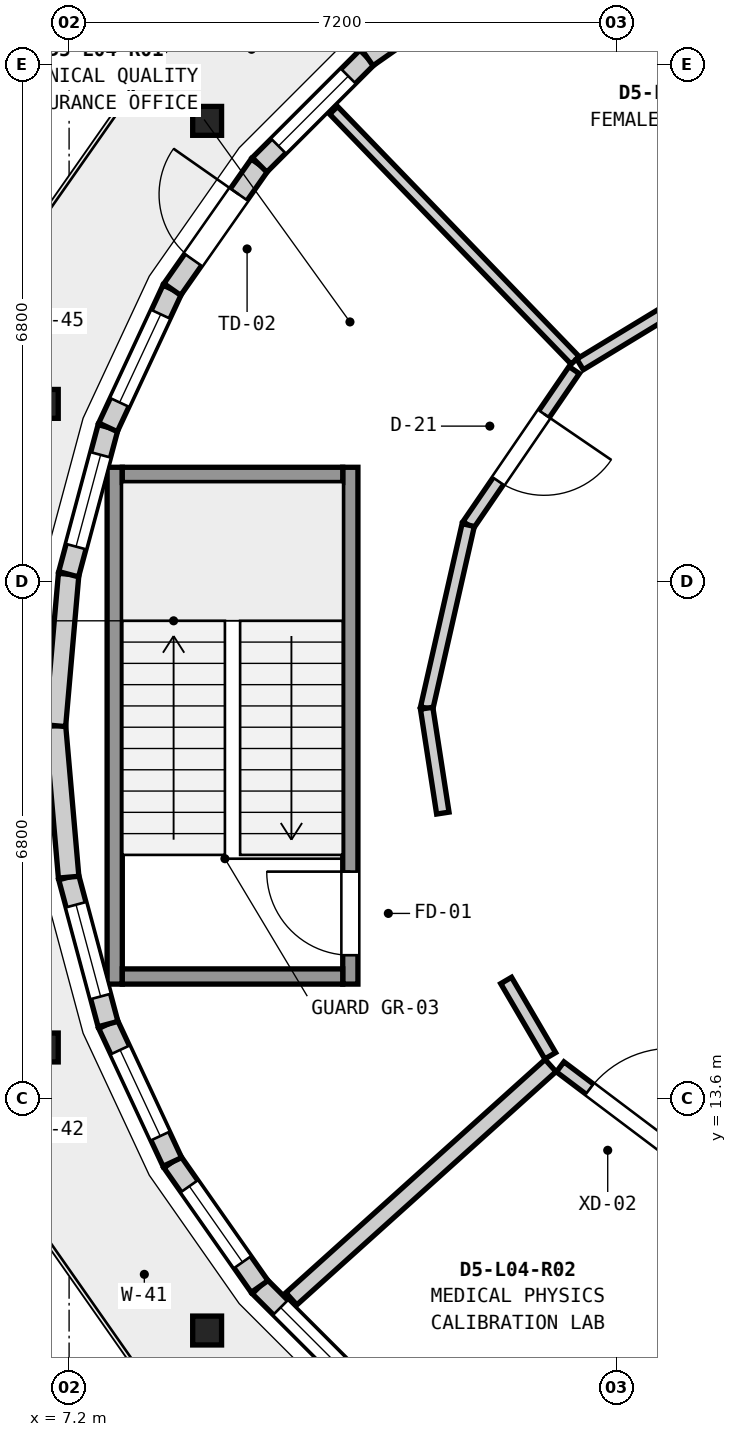
"""IFC4 building model, lengths in metres.
Left out: names, types, materials, properties, quantities, classifications, styles, units other than length and angle.
Written with IfcOpenShell. Run it as: python <this file> out.ifc"""

import sys

from ifc_helpers import new_model, si_unit, direction, frame, frame_2d, origin, origin_2d, place, context, subcontext, project, spatial, rectangle, circle, extrude, element, fill, save


model = new_model("IFC4")
c1 = context("Model", 3, precision=1e-05, world=origin(), true_north=direction((0.0, 1.0)))
c2 = subcontext(c1, "Body", "Model", "MODEL_VIEW")
j1 = project(units=[si_unit("LENGTHUNIT", "METRE"), si_unit("PLANEANGLEUNIT", "RADIAN")], contexts=[c1])
p1 = place(None, origin())
s1 = spatial("IfcSite", under=j1, at=p1, CompositionType="ELEMENT")
p2 = place(p1, origin())
s2 = spatial("IfcBuilding", under=s1, at=p2, CompositionType="ELEMENT")
p3 = place(p2, frame((0.0, 0.0, 17.15)))
s3 = spatial("IfcBuildingStorey", under=s2, at=p3, CompositionType="ELEMENT", Elevation=17.15)
for number, where, z_axis, x_axis in (
    (1, (9.016, 26.458, 0.0), (0.0, 0.0, 1.0), (1.0, 0.0, 0.0)),
    (2, (6.867, 22.734, 0.0), (0.0, 0.0, 1.0), (1.0, 0.0, 0.0)),
    (3, (6.867, 14.266, 0.0), (0.0, 0.0, 1.0), (1.0, 0.0, 0.0)),
    (4, (9.016, 10.542, 0.0), (0.0, 0.0, 1.0), (1.0, 0.0, 0.0)),
):
    element("IfcColumn", number, at=place(p3, frame(where, z_axis=z_axis, x_axis=x_axis)), inside=s3, PredefinedType="PILASTER", context=c2, shape_type="SweptSolid", body=[
        extrude(circle(Radius=0.19, at=origin_2d()), origin(), (0.0, 0.0, 1.0), 4.2),
    ])
p4 = place(p3, frame((11.121, 9.706, 0.0), z_axis=(0.0, 0.0, 1.0), x_axis=(-0.707106781187, 0.707106781187, 0.0)))
e5 = element("IfcWall", 5, at=p4, inside=s3, PredefinedType="ELEMENTEDWALL", context=c2, shape_type="SweptSolid", body=[
    extrude(rectangle(XDim=2.001, YDim=0.27, at=frame_2d((1.0, 0.0))), origin(), (0.0, 0.0, 1.0), 3.314),
])
p5 = place(p4, frame((0.391, 0.0, 0.85)))
e6 = element("IfcOpeningElement", 6, at=p5, cuts=e5, PredefinedType="OPENING", context=c2, shape_type="SweptSolid", body=[
    extrude(rectangle(XDim=1.22, YDim=1.5, at=frame_2d((0.61, 0.75))), frame((0.0, 0.145, 0.0), z_axis=(0.0, -1.0, 0.0), x_axis=(1.0, 0.0, 0.0)), (0.0, 0.0, 1.0), 0.29),
])
p6 = place(p3, frame((9.706, 11.121, 0.0), z_axis=(0.0, 0.0, 1.0), x_axis=(-0.573699793029, 0.819065655169, 0.0)))
e7 = element("IfcWall", 7, at=p6, inside=s3, PredefinedType="ELEMENTEDWALL", context=c2, shape_type="SweptSolid", body=[
    extrude(rectangle(XDim=2.001, YDim=0.27, at=frame_2d((1.0, 0.0))), origin(), (0.0, 0.0, 1.0), 3.314),
])
p7 = place(p6, frame((0.391, 0.0, 0.85)))
e8 = element("IfcOpeningElement", 8, at=p7, cuts=e7, PredefinedType="OPENING", context=c2, shape_type="SweptSolid", body=[
    extrude(rectangle(XDim=1.22, YDim=1.8, at=frame_2d((0.61, 0.9))), frame((0.0, 0.145, 0.0), z_axis=(0.0, -1.0, 0.0), x_axis=(1.0, 0.0, 0.0)), (0.0, 0.0, 1.0), 0.29),
])
p8 = place(p3, frame((8.558, 12.76, 0.0), z_axis=(0.0, 0.0, 1.0), x_axis=(-0.422751915713, 0.906245451167, 0.0)))
e9 = element("IfcWall", 9, at=p8, inside=s3, PredefinedType="ELEMENTEDWALL", context=c2, shape_type="SweptSolid", body=[
    extrude(rectangle(XDim=2.002, YDim=0.27, at=frame_2d((1.001, 0.0))), origin(), (0.0, 0.0, 1.0), 3.314),
])
p9 = place(p8, frame((0.376, 0.0, 0.85)))
e10 = element("IfcOpeningElement", 10, at=p9, cuts=e9, PredefinedType="OPENING", context=c2, shape_type="SweptSolid", body=[
    extrude(rectangle(XDim=1.25, YDim=1.5, at=frame_2d((0.625, 0.75))), frame((0.0, 0.145, 0.0), z_axis=(0.0, -1.0, 0.0), x_axis=(1.0, 0.0, 0.0)), (0.0, 0.0, 1.0), 0.29),
])
p10 = place(p3, frame((7.712, 14.574, 0.0), z_axis=(0.0, 0.0, 1.0), x_axis=(-0.258748280927, 0.965944784715, 0.0)))
e11 = element("IfcWall", 11, at=p10, inside=s3, PredefinedType="ELEMENTEDWALL", context=c2, shape_type="SweptSolid", body=[
    extrude(rectangle(XDim=2.001, YDim=0.27, at=frame_2d((1.0, 0.0))), origin(), (0.0, 0.0, 1.0), 3.314),
])
p11 = place(p10, frame((0.376, 0.0, 0.85)))
e12 = element("IfcOpeningElement", 12, at=p11, cuts=e11, PredefinedType="OPENING", context=c2, shape_type="SweptSolid", body=[
    extrude(rectangle(XDim=1.25, YDim=1.8, at=frame_2d((0.625, 0.9))), frame((0.0, 0.145, 0.0), z_axis=(0.0, -1.0, 0.0), x_axis=(1.0, 0.0, 0.0)), (0.0, 0.0, 1.0), 0.29),
])
for number, where, z_axis, x_axis in (
    (13, (7.194, 16.507, 0.0), (0.0, 0.0, 1.0), (-0.087, 0.996, 0.0)),
    (14, (7.02, 18.5, 0.0), (0.0, 0.0, 1.0), (0.087, 0.996, 0.0)),
):
    element("IfcWall", number, at=place(p3, frame(where, z_axis=z_axis, x_axis=x_axis)), inside=s3, PredefinedType="ELEMENTEDWALL", context=c2, shape_type="SweptSolid", body=[
        extrude(rectangle(XDim=2.0, YDim=0.27, at=frame_2d((1.0, 0.0))), origin(), (0.0, 0.0, 1.0), 3.314),
    ])
p12 = place(p3, frame((7.194, 20.493, 0.0), z_axis=(0.0, 0.0, 1.0), x_axis=(0.258748280927, 0.965944784715, 0.0)))
e15 = element("IfcWall", 15, at=p12, inside=s3, PredefinedType="ELEMENTEDWALL", context=c2, shape_type="SweptSolid", body=[
    extrude(rectangle(XDim=2.001, YDim=0.27, at=frame_2d((1.0, 0.0))), origin(), (0.0, 0.0, 1.0), 3.314),
])
p13 = place(p12, frame((0.376, 0.0, 0.85)))
e16 = element("IfcOpeningElement", 16, at=p13, cuts=e15, PredefinedType="OPENING", context=c2, shape_type="SweptSolid", body=[
    extrude(rectangle(XDim=1.25, YDim=2.1, at=frame_2d((0.625, 1.05))), frame((0.0, 0.145, 0.0), z_axis=(0.0, -1.0, 0.0), x_axis=(1.0, 0.0, 0.0)), (0.0, 0.0, 1.0), 0.29),
])
p14 = place(p3, frame((7.712, 22.426, 0.0), z_axis=(0.0, 0.0, 1.0), x_axis=(0.422751915713, 0.906245451167, 0.0)))
e17 = element("IfcWall", 17, at=p14, inside=s3, PredefinedType="ELEMENTEDWALL", context=c2, shape_type="SweptSolid", body=[
    extrude(rectangle(XDim=2.002, YDim=0.27, at=frame_2d((1.001, 0.0))), origin(), (0.0, 0.0, 1.0), 3.314),
])
p15 = place(p14, frame((0.361, 0.0, 0.85)))
e18 = element("IfcOpeningElement", 18, at=p15, cuts=e17, PredefinedType="OPENING", context=c2, shape_type="SweptSolid", body=[
    extrude(rectangle(XDim=1.28, YDim=1.65, at=frame_2d((0.64, 0.825))), frame((0.0, 0.145, 0.0), z_axis=(0.0, -1.0, 0.0), x_axis=(1.0, 0.0, 0.0)), (0.0, 0.0, 1.0), 0.29),
])
p16 = place(p3, frame((8.558, 24.24, 0.0), z_axis=(0.0, 0.0, 1.0), x_axis=(0.573699793029, 0.819065655169, 0.0)))
e19 = element("IfcWall", 19, at=p16, inside=s3, PredefinedType="ELEMENTEDWALL", context=c2, shape_type="SweptSolid", body=[
    extrude(rectangle(XDim=2.001, YDim=0.27, at=frame_2d((1.0, 0.0))), origin(), (0.0, 0.0, 1.0), 3.314),
])
p17 = place(p16, frame((0.476, 0.0, 0.0)))
e20 = element("IfcOpeningElement", 20, at=p17, cuts=e19, PredefinedType="OPENING", context=c2, shape_type="SweptSolid", body=[
    extrude(rectangle(XDim=1.05, YDim=2.15, at=frame_2d((0.525, 1.075))), frame((0.0, 0.145, 0.0), z_axis=(0.0, -1.0, 0.0), x_axis=(1.0, 0.0, 0.0)), (0.0, 0.0, 1.0), 0.29),
])
p18 = place(p3, frame((9.706, 25.879, 0.0), z_axis=(0.0, 0.0, 1.0), x_axis=(0.707106781187, 0.707106781187, 0.0)))
e21 = element("IfcWall", 21, at=p18, inside=s3, PredefinedType="ELEMENTEDWALL", context=c2, shape_type="SweptSolid", body=[
    extrude(rectangle(XDim=2.001, YDim=0.27, at=frame_2d((1.0, 0.0))), origin(), (0.0, 0.0, 1.0), 3.314),
])
p19 = place(p18, frame((0.351, 0.0, 0.85)))
e22 = element("IfcOpeningElement", 22, at=p19, cuts=e21, PredefinedType="OPENING", context=c2, shape_type="SweptSolid", body=[
    extrude(rectangle(XDim=1.3, YDim=1.4, at=frame_2d((0.65, 0.7))), frame((0.0, 0.145, 0.0), z_axis=(0.0, -1.0, 0.0), x_axis=(1.0, 0.0, 0.0)), (0.0, 0.0, 1.0), 0.29),
])
p20 = place(p3, frame((11.121, 27.294, 0.0), z_axis=(0.0, 0.0, 1.0), x_axis=(0.819065655169, 0.573699793029, 0.0)))
e23 = element("IfcWall", 23, at=p20, inside=s3, PredefinedType="ELEMENTEDWALL", context=c2, shape_type="SweptSolid", body=[
    extrude(rectangle(XDim=2.001, YDim=0.27, at=frame_2d((1.0, 0.0))), origin(), (0.0, 0.0, 1.0), 3.314),
])
p21 = place(p20, frame((0.351, 0.0, 0.85)))
e24 = element("IfcOpeningElement", 24, at=p21, cuts=e23, PredefinedType="OPENING", context=c2, shape_type="SweptSolid", body=[
    extrude(rectangle(XDim=1.3, YDim=1.7, at=frame_2d((0.65, 0.85))), frame((0.0, 0.145, 0.0), z_axis=(0.0, -1.0, 0.0), x_axis=(1.0, 0.0, 0.0)), (0.0, 0.0, 1.0), 0.29),
])
p22 = place(p3, frame((10.9, 15.1, 0.0), z_axis=(0.0, 0.0, 1.0), x_axis=(0.0, 1.0, 0.0)))
e25 = element("IfcWall", 25, at=p22, inside=s3, PredefinedType="SHEAR", context=c2, shape_type="SweptSolid", body=[
    extrude(rectangle(XDim=6.8, YDim=0.2, at=frame_2d((3.4, 0.0))), origin(), (0.0, 0.0, 1.0), 3.96),
])
p23 = place(p22, frame((0.38, 0.0, 0.0)))
e26 = element("IfcOpeningElement", 26, at=p23, cuts=e25, PredefinedType="OPENING", context=c2, shape_type="SweptSolid", body=[
    extrude(rectangle(XDim=1.1, YDim=2.15, at=frame_2d((0.55, 1.075))), frame((0.0, 0.11, 0.0), z_axis=(0.0, -1.0, 0.0), x_axis=(1.0, 0.0, 0.0)), (0.0, 0.0, 1.0), 0.22),
])
p24 = place(p3, frame((7.8, 15.1, 0.0), z_axis=(0.0, 0.0, 1.0), x_axis=(0.0, 1.0, 0.0)))
e27 = element("IfcWall", 27, at=p24, inside=s3, PredefinedType="SHEAR", context=c2, shape_type="SweptSolid", body=[
    extrude(rectangle(XDim=6.8, YDim=0.2, at=frame_2d((3.4, 0.0))), origin(), (0.0, 0.0, 1.0), 3.96),
])
for number, where, z_axis, x_axis in (
    (28, (10.8, 15.2, 0.0), (0.0, 0.0, 1.0), (-1.0, 0.0, 0.0)),
    (29, (10.8, 21.8, 0.0), (0.0, 0.0, 1.0), (-1.0, 0.0, 0.0)),
):
    element("IfcWall", number, at=place(p3, frame(where, z_axis=z_axis, x_axis=x_axis)), inside=s3, PredefinedType="SHEAR", context=c2, shape_type="SweptSolid", body=[
        extrude(rectangle(XDim=2.9, YDim=0.2, at=frame_2d((1.45, 0.0))), origin(), (0.0, 0.0, 1.0), 3.96),
    ])
p25 = place(p3, frame((13.858, 23.307, 0.0), z_axis=(0.0, 0.0, 1.0), x_axis=(-0.694751659022, 0.719249700928, 0.0)))
e30 = element("IfcWall", 30, at=p25, inside=s3, PredefinedType="PARTITIONING", context=c2, shape_type="SweptSolid", body=[
    extrude(rectangle(XDim=4.574, YDim=0.145, at=frame_2d((2.287, 0.0))), origin(), (0.0, 0.0, 1.0), 3.279),
])
p26 = place(p3, frame((13.534, 14.028, 0.0), z_axis=(0.0, 0.0, 1.0), x_axis=(-0.743275623073, -0.668985312354, 0.0)))
e31 = element("IfcWall", 31, at=p26, inside=s3, PredefinedType="SOLIDWALL", context=c2, shape_type="SweptSolid", body=[
    extrude(rectangle(XDim=4.588, YDim=0.215, at=frame_2d((2.294, 0.0))), origin(), (0.0, 0.0, 1.0), 3.279),
])
p27 = place(p3, frame((13.845, 23.179, 0.0), z_axis=(0.0, 0.0, 1.0), x_axis=(-0.564379150031, -0.825515702462, 0.0)))
e32 = element("IfcWall", 32, at=p27, inside=s3, PredefinedType="PARTITIONING", context=c2, shape_type="SweptSolid", body=[
    extrude(rectangle(XDim=2.47, YDim=0.165, at=frame_2d((1.235, 0.0))), origin(), (0.0, 0.0, 1.0), 3.279),
])
p28 = place(p27, frame((0.7, 0.0, 0.0)))
e33 = element("IfcOpeningElement", 33, at=p28, cuts=e32, PredefinedType="OPENING", context=c2, shape_type="SweptSolid", body=[
    extrude(rectangle(XDim=1.07, YDim=2.2, at=frame_2d((0.535, 1.1))), frame((0.0, 0.093, 0.0), z_axis=(0.0, -1.0, 0.0), x_axis=(1.0, 0.0, 0.0)), (0.0, 0.0, 1.0), 0.185),
])
p29 = place(p3, frame((12.451, 21.14, 0.0), z_axis=(0.0, 0.0, 1.0), x_axis=(-0.221300832748, -0.975205589312, 0.0)))
e34 = element("IfcWall", 34, at=p29, inside=s3, PredefinedType="PARTITIONING", context=c2, shape_type="SweptSolid", body=[
    extrude(rectangle(XDim=2.471, YDim=0.165, at=frame_2d((1.236, 0.0))), origin(), (0.0, 0.0, 1.0), 3.279),
])
p30 = place(p3, frame((11.904, 18.73, 0.0), z_axis=(0.0, 0.0, 1.0), x_axis=(0.15247764233, -0.988306920238, 0.0)))
e35 = element("IfcWall", 35, at=p30, inside=s3, PredefinedType="PARTITIONING", context=c2, shape_type="SweptSolid", body=[
    extrude(rectangle(XDim=1.396, YDim=0.165, at=frame_2d((0.698, 0.0))), origin(), (0.0, 0.0, 1.0), 3.279),
])
p31 = place(p3, frame((12.95, 15.148, 0.0), z_axis=(0.0, 0.0, 1.0), x_axis=(0.505179201569, -0.863014469347, 0.0)))
e36 = element("IfcWall", 36, at=p31, inside=s3, PredefinedType="PARTITIONING", context=c2, shape_type="SweptSolid", body=[
    extrude(rectangle(XDim=1.148, YDim=0.165, at=frame_2d((0.574, 0.0))), origin(), (0.0, 0.0, 1.0), 3.279),
])
p32 = place(p3, frame((13.661, 14.011, 0.0), z_axis=(0.0, 0.0, 1.0), x_axis=(0.798557639329, -0.601918347177, 0.0)))
e37 = element("IfcWall", 37, at=p32, inside=s3, PredefinedType="PARTITIONING", context=c2, shape_type="SweptSolid", body=[
    extrude(rectangle(XDim=2.319, YDim=0.165, at=frame_2d((1.16, 0.0))), origin(), (0.0, 0.0, 1.0), 3.279),
])
p33 = place(p32, frame((0.485, 0.0, 0.0)))
e38 = element("IfcOpeningElement", 38, at=p33, cuts=e37, PredefinedType="OPENING", context=c2, shape_type="SweptSolid", body=[
    extrude(rectangle(XDim=1.35, YDim=2.22, at=frame_2d((0.675, 1.11))), frame((0.0, 0.093, 0.0), z_axis=(0.0, -1.0, 0.0), x_axis=(1.0, 0.0, 0.0)), (0.0, 0.0, 1.0), 0.185),
])
p34 = place(p3, frame((16.388, 24.753, 0.0), z_axis=(0.0, 0.0, 1.0), x_axis=(-0.854492488108, -0.519463750196, 0.0)))
e39 = element("IfcWall", 39, at=p34, inside=s3, PredefinedType="PARTITIONING", context=c2, shape_type="SweptSolid", body=[
    extrude(rectangle(XDim=2.886, YDim=0.165, at=frame_2d((1.443, 0.0))), origin(), (0.0, 0.0, 1.0), 3.279),
])
p35 = place(p5, origin())
e40 = element("IfcWindow", 40, at=p35, inside=s3, PartitioningType="SINGLE_PANEL", PredefinedType="WINDOW", context=c2, shape_type="SweptSolid", body=[
    extrude(rectangle(XDim=1.22, YDim=1.5, at=frame_2d((0.61, 0.75))), frame((0.0, 0.03, 0.0), z_axis=(0.0, -1.0, 0.0), x_axis=(1.0, 0.0, 0.0)), (0.0, 0.0, 1.0), 0.06),
])
fill(e6, e40)
p36 = place(p7, origin())
e41 = element("IfcWindow", 41, at=p36, inside=s3, PartitioningType="SINGLE_PANEL", PredefinedType="WINDOW", context=c2, shape_type="SweptSolid", body=[
    extrude(rectangle(XDim=1.22, YDim=1.8, at=frame_2d((0.61, 0.9))), frame((0.0, 0.03, 0.0), z_axis=(0.0, -1.0, 0.0), x_axis=(1.0, 0.0, 0.0)), (0.0, 0.0, 1.0), 0.06),
])
fill(e8, e41)
p37 = place(p9, origin())
e42 = element("IfcWindow", 42, at=p37, inside=s3, PartitioningType="SINGLE_PANEL", PredefinedType="WINDOW", context=c2, shape_type="SweptSolid", body=[
    extrude(rectangle(XDim=1.25, YDim=1.5, at=frame_2d((0.625, 0.75))), frame((0.0, 0.03, 0.0), z_axis=(0.0, -1.0, 0.0), x_axis=(1.0, 0.0, 0.0)), (0.0, 0.0, 1.0), 0.06),
])
fill(e10, e42)
p38 = place(p11, origin())
e43 = element("IfcWindow", 43, at=p38, inside=s3, PartitioningType="SINGLE_PANEL", PredefinedType="WINDOW", context=c2, shape_type="SweptSolid", body=[
    extrude(rectangle(XDim=1.25, YDim=1.8, at=frame_2d((0.625, 0.9))), frame((0.0, 0.03, 0.0), z_axis=(0.0, -1.0, 0.0), x_axis=(1.0, 0.0, 0.0)), (0.0, 0.0, 1.0), 0.06),
])
fill(e12, e43)
p39 = place(p13, origin())
e44 = element("IfcWindow", 44, at=p39, inside=s3, PartitioningType="SINGLE_PANEL", PredefinedType="WINDOW", context=c2, shape_type="SweptSolid", body=[
    extrude(rectangle(XDim=1.25, YDim=2.1, at=frame_2d((0.625, 1.05))), frame((0.0, 0.03, 0.0), z_axis=(0.0, -1.0, 0.0), x_axis=(1.0, 0.0, 0.0)), (0.0, 0.0, 1.0), 0.06),
])
fill(e16, e44)
p40 = place(p15, origin())
e45 = element("IfcWindow", 45, at=p40, inside=s3, PartitioningType="SINGLE_PANEL", PredefinedType="WINDOW", context=c2, shape_type="SweptSolid", body=[
    extrude(rectangle(XDim=1.28, YDim=1.65, at=frame_2d((0.64, 0.825))), frame((0.0, 0.03, 0.0), z_axis=(0.0, -1.0, 0.0), x_axis=(1.0, 0.0, 0.0)), (0.0, 0.0, 1.0), 0.06),
])
fill(e18, e45)
p41 = place(p17, origin())
e46 = element("IfcDoor", 46, at=p41, inside=s3, OperationType="SINGLE_SWING_RIGHT", PredefinedType="DOOR", context=c2, shape_type="SweptSolid", body=[
    extrude(rectangle(XDim=1.05, YDim=2.15, at=frame_2d((0.525, 1.075))), frame((0.0, 0.025, 0.0), z_axis=(0.0, -1.0, 0.0), x_axis=(1.0, 0.0, 0.0)), (0.0, 0.0, 1.0), 0.05),
])
fill(e20, e46)
p42 = place(p19, origin())
e47 = element("IfcWindow", 47, at=p42, inside=s3, PartitioningType="SINGLE_PANEL", PredefinedType="WINDOW", context=c2, shape_type="SweptSolid", body=[
    extrude(rectangle(XDim=1.3, YDim=1.4, at=frame_2d((0.65, 0.7))), frame((0.0, 0.03, 0.0), z_axis=(0.0, -1.0, 0.0), x_axis=(1.0, 0.0, 0.0)), (0.0, 0.0, 1.0), 0.06),
])
fill(e22, e47)
p43 = place(p23, origin())
e48 = element("IfcDoor", 48, at=p43, inside=s3, OperationType="SINGLE_SWING_RIGHT", PredefinedType="DOOR", context=c2, shape_type="SweptSolid", body=[
    extrude(rectangle(XDim=1.1, YDim=2.15, at=frame_2d((0.55, 1.075))), frame((0.0, 0.025, 0.0), z_axis=(0.0, -1.0, 0.0), x_axis=(1.0, 0.0, 0.0)), (0.0, 0.0, 1.0), 0.05),
])
fill(e26, e48)
p44 = place(p28, origin())
e49 = element("IfcDoor", 49, at=p44, inside=s3, OperationType="SINGLE_SWING_LEFT", PredefinedType="DOOR", context=c2, shape_type="SweptSolid", body=[
    extrude(rectangle(XDim=1.07, YDim=2.2, at=frame_2d((0.535, 1.1))), frame((0.0, 0.025, 0.0), z_axis=(0.0, -1.0, 0.0), x_axis=(1.0, 0.0, 0.0)), (0.0, 0.0, 1.0), 0.05),
])
fill(e33, e49)
p45 = place(p33, origin())
e50 = element("IfcDoor", 50, at=p45, inside=s3, OperationType="SINGLE_SWING_RIGHT", PredefinedType="DOOR", context=c2, shape_type="SweptSolid", body=[
    extrude(rectangle(XDim=1.35, YDim=2.22, at=frame_2d((0.675, 1.11))), frame((0.0, 0.025, 0.0), z_axis=(0.0, -1.0, 0.0), x_axis=(1.0, 0.0, 0.0)), (0.0, 0.0, 1.0), 0.05),
])
fill(e38, e50)
save(model, sys.argv[1])
